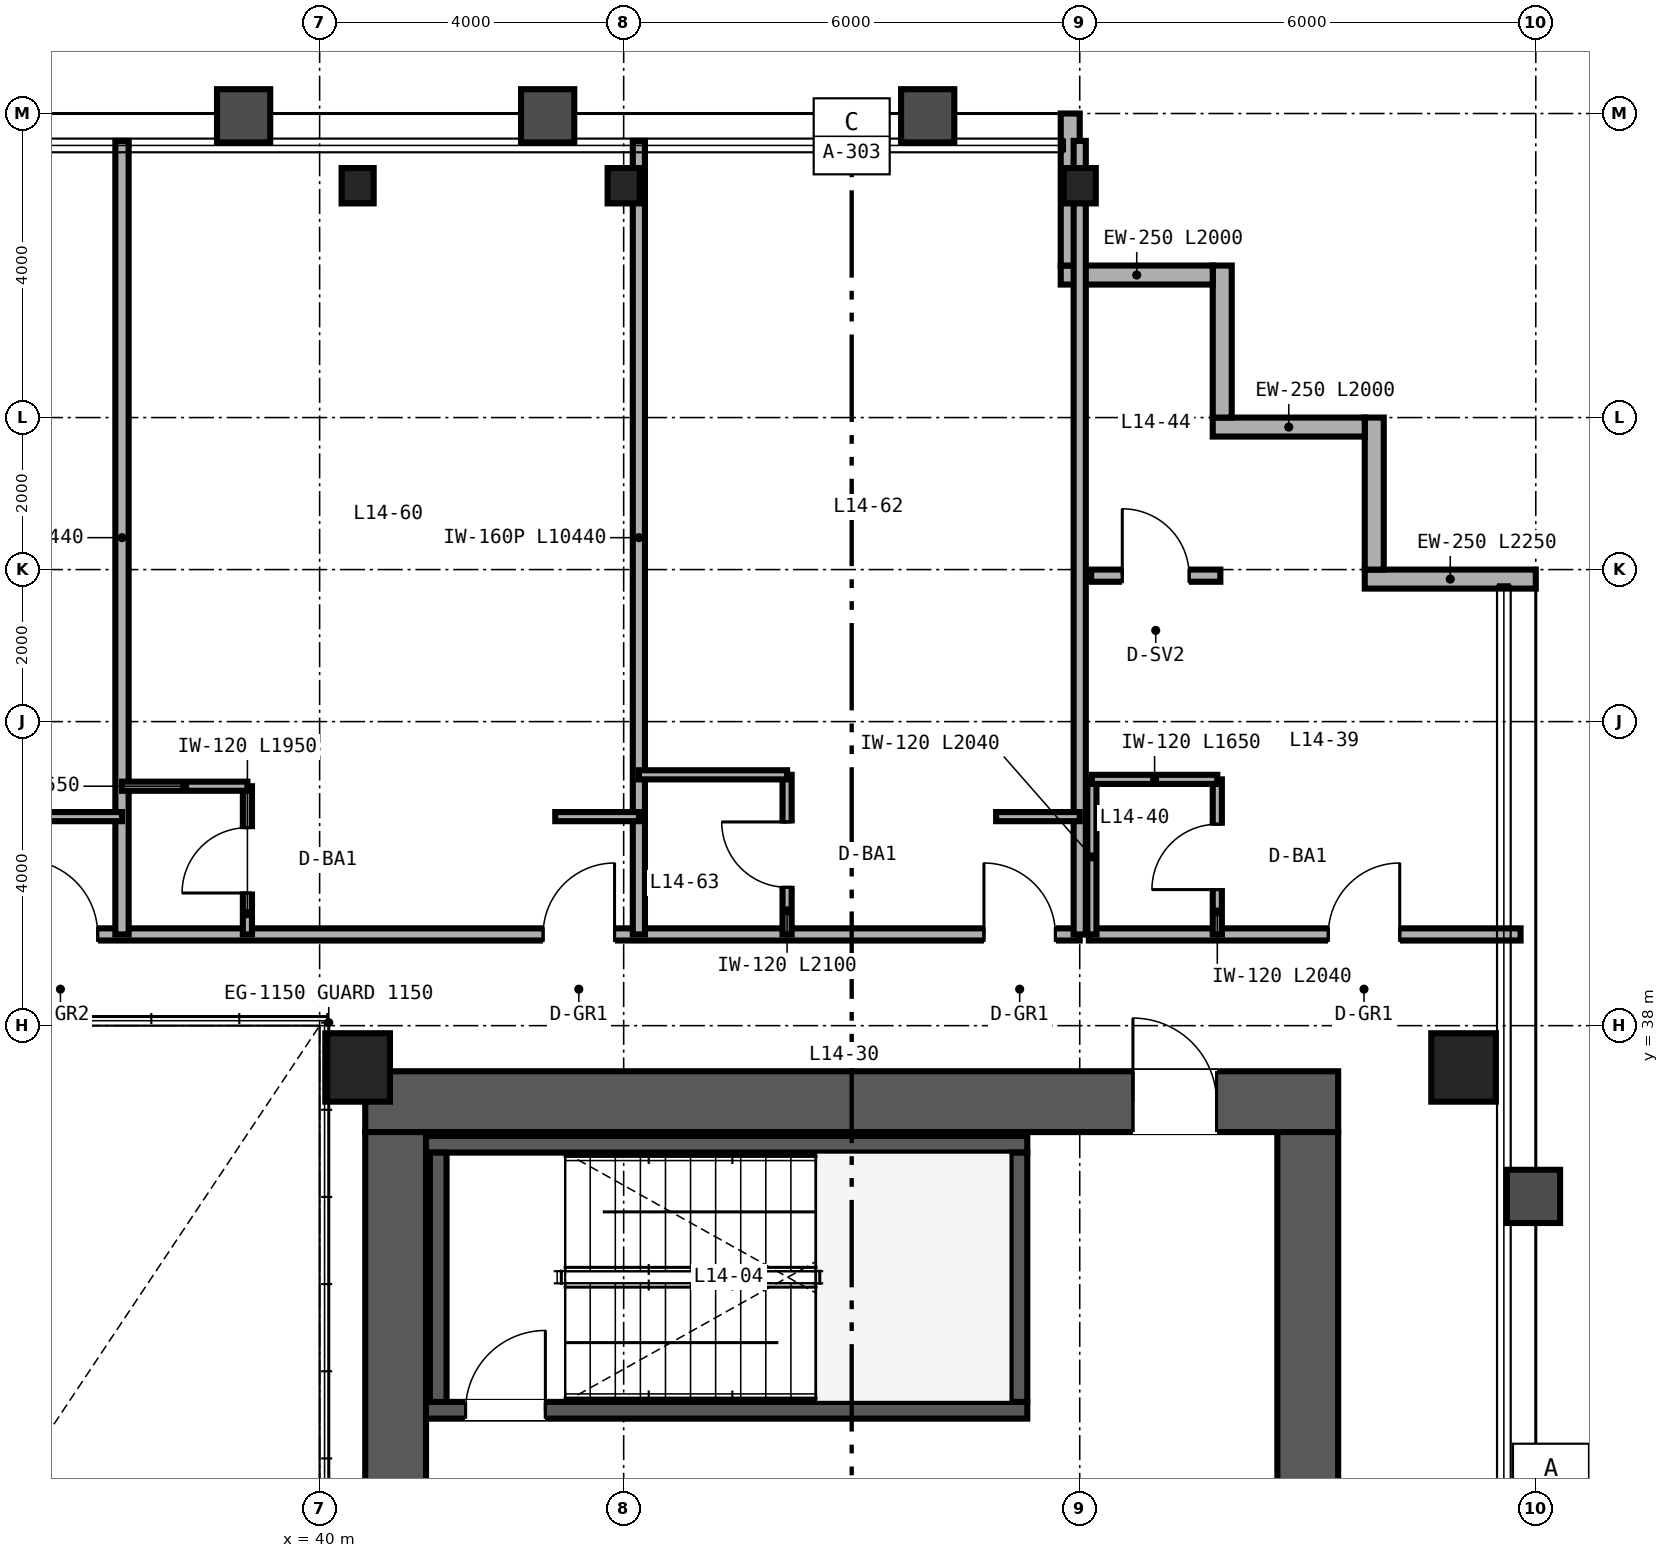
"""IFC4 building model, lengths in metres.
Left out: names, types, materials, properties, quantities, classifications, styles, units other than length and angle.
Written with IfcOpenShell. Run it as: python <this file> out.ifc"""

import sys

from ifc_helpers import new_model, si_unit, direction, frame, frame_2d, origin, origin_2d, place, context, subcontext, project, spatial, rectangle, hollow_rectangle, i_section, extrude, source, transform, mapped, element, fill, save


model = new_model("IFC4")
c1 = context("Model", 3, precision=1e-05, world=origin(), true_north=direction((0.0, 1.0)))
c2 = subcontext(c1, "Body", "Model", "MODEL_VIEW")
j1 = project(units=[si_unit("LENGTHUNIT", "METRE"), si_unit("PLANEANGLEUNIT", "RADIAN")], contexts=[c1])
p1 = place(None, origin())
s1 = spatial("IfcSite", under=j1, at=p1, CompositionType="ELEMENT")
p2 = place(p1, origin())
s2 = spatial("IfcBuilding", under=s1, at=p2, CompositionType="ELEMENT")
p3 = place(p2, frame((0.0, 0.0, 60.0)))
s3 = spatial("IfcBuildingStorey", under=s2, at=p3, CompositionType="ELEMENT", Elevation=60.0)
p4 = place(p3, frame((40.6, 37.0, 0.0), z_axis=(0.0, 0.0, 1.0), x_axis=(1.0, 0.0, 0.0)))
e1 = element("IfcWall", 1, at=p4, inside=s3, PredefinedType="SHEAR", context=c2, shape_type="SweptSolid", body=[
    extrude(rectangle(XDim=12.8, YDim=0.8, at=frame_2d((6.4, 0.0))), origin(), (0.0, 0.0, 1.0), 3.35),
])
p5 = place(p4, frame((10.1, 0.0, 0.0)))
e2 = element("IfcOpeningElement", 2, at=p5, cuts=e1, PredefinedType="OPENING", context=c2, shape_type="SweptSolid", body=[
    extrude(rectangle(XDim=1.1, YDim=2.15, at=frame_2d((0.55, 1.075))), frame((0.0, 0.41, 0.0), z_axis=(0.0, -1.0, 0.0), x_axis=(1.0, 0.0, 0.0)), (0.0, 0.0, 1.0), 0.82),
])
for number, where, z_axis, x_axis in (
    (3, (41.0, 15.4, 0.0), (0.0, 0.0, 1.0), (0.0, 1.0, 0.0)),
    (4, (53.0, 15.4, 0.0), (0.0, 0.0, 1.0), (0.0, 1.0, 0.0)),
):
    element("IfcWall", number, at=place(p3, frame(where, z_axis=z_axis, x_axis=x_axis)), inside=s3, PredefinedType="SHEAR", context=c2, shape_type="SweptSolid", body=[
        extrude(rectangle(XDim=21.2, YDim=0.8, at=frame_2d((10.6, 0.0))), origin(), (0.0, 0.0, 1.0), 3.35),
    ])
p6 = place(p3, frame((41.4, 32.94, 0.0), z_axis=(0.0, 0.0, 1.0), x_axis=(1.0, 0.0, 0.0)))
e5 = element("IfcWall", 5, at=p6, inside=s3, PredefinedType="SHEAR", context=c2, shape_type="SweptSolid", body=[
    extrude(rectangle(XDim=7.91, YDim=0.22, at=frame_2d((3.955, 0.0))), origin(), (0.0, 0.0, 1.0), 3.4),
])
p7 = place(p6, frame((0.52, 0.0, 0.0)))
e6 = element("IfcOpeningElement", 6, at=p7, cuts=e5, PredefinedType="OPENING", context=c2, shape_type="SweptSolid", body=[
    extrude(rectangle(XDim=1.05, YDim=2.15, at=frame_2d((0.525, 1.075))), frame((0.0, 0.12, 0.0), z_axis=(0.0, -1.0, 0.0), x_axis=(1.0, 0.0, 0.0)), (0.0, 0.0, 1.0), 0.24),
])
p8 = place(p3, frame((41.4, 36.44, 0.0), z_axis=(0.0, 0.0, 1.0), x_axis=(1.0, 0.0, 0.0)))
e7 = element("IfcWall", 7, at=p8, inside=s3, PredefinedType="SHEAR", context=c2, shape_type="SweptSolid", body=[
    extrude(rectangle(XDim=7.91, YDim=0.22, at=frame_2d((3.955, 0.0))), origin(), (0.0, 0.0, 1.0), 3.4),
])
for number, where, z_axis, x_axis in (
    (8, (41.56, 33.05, 0.0), (0.0, 0.0, 1.0), (0.0, 1.0, 0.0)),
    (9, (49.2, 33.05, 0.0), (0.0, 0.0, 1.0), (0.0, 1.0, 0.0)),
):
    element("IfcWall", number, at=place(p3, frame(where, z_axis=z_axis, x_axis=x_axis)), inside=s3, PredefinedType="SHEAR", context=c2, shape_type="SweptSolid", body=[
        extrude(rectangle(XDim=3.28, YDim=0.22, at=frame_2d((1.64, 0.0))), origin(), (0.0, 0.0, 1.0), 3.4),
    ])
m1 = source(origin(), c2, "Body", "SweptSolid", [
    extrude(hollow_rectangle(XDim=0.85, YDim=0.9, WallThickness=0.04, at=origin_2d()), origin(), (0.0, 0.0, 1.0), 3.35),
])
for number, where, z_axis, x_axis in (
    (10, (40.5, 37.45, 0.0), (0.0, 0.0, 1.0), (1.0, 0.0, 0.0)),
    (11, (55.05, 37.45, 0.0), (0.0, 0.0, 1.0), (1.0, 0.0, 0.0)),
):
    element("IfcColumn", number, at=place(p3, frame(where, z_axis=z_axis, x_axis=x_axis)), inside=s3, PredefinedType="COLUMN", context=c2, shape_type="MappedRepresentation", body=[
        mapped(m1, transform((0.0, 0.0, 0.0), scale=1.0)),
    ])
m2 = source(origin(), c2, "Body", "SweptSolid", [
    extrude(i_section(OverallWidth=0.422, OverallDepth=0.465, WebThickness=0.045, FlangeThickness=0.073, FilletRadius=0.025, at=origin_2d()), origin(), (0.0, 0.0, 1.0), 3.35),
])
for number, where, z_axis, x_axis in (
    (12, (40.5, 49.05, 0.0), (0.0, 0.0, 1.0), (1.0, 0.0, 0.0)),
    (13, (44.0, 49.05, 0.0), (0.0, 0.0, 1.0), (1.0, 0.0, 0.0)),
    (14, (50.0, 49.05, 0.0), (0.0, 0.0, 1.0), (1.0, 0.0, 0.0)),
):
    element("IfcColumn", number, at=place(p3, frame(where, z_axis=z_axis, x_axis=x_axis)), inside=s3, PredefinedType="COLUMN", context=c2, shape_type="MappedRepresentation", body=[
        mapped(m2, transform((0.0, 0.0, 0.0), scale=1.0)),
    ])
p9 = place(p3, frame((56.0, 43.875, 0.0), z_axis=(0.0, 0.0, 1.0), x_axis=(-1.0, 0.0, 0.0)))
e15 = element("IfcWall", 15, at=p9, inside=s3, PredefinedType="SOLIDWALL", context=c2, shape_type="SweptSolid", body=[
    extrude(rectangle(XDim=2.25, YDim=0.25, at=frame_2d((1.125, 0.0))), origin(), (0.0, 0.0, 1.0), 3.35),
])
for number, where, z_axis, x_axis in (
    (16, (53.875, 44.0, 0.0), (0.0, 0.0, 1.0), (0.0, 1.0, 0.0)),
    (17, (53.75, 45.875, 0.0), (0.0, 0.0, 1.0), (-1.0, 0.0, 0.0)),
    (18, (51.875, 46.0, 0.0), (0.0, 0.0, 1.0), (0.0, 1.0, 0.0)),
    (19, (51.75, 47.875, 0.0), (0.0, 0.0, 1.0), (-1.0, 0.0, 0.0)),
):
    element("IfcWall", number, at=place(p3, frame(where, z_axis=z_axis, x_axis=x_axis)), inside=s3, PredefinedType="SOLIDWALL", context=c2, shape_type="SweptSolid", body=[
        extrude(rectangle(XDim=2.0, YDim=0.25, at=frame_2d((1.0, 0.0))), origin(), (0.0, 0.0, 1.0), 3.35),
    ])
p10 = place(p3, frame((49.875, 48.0, 0.0), z_axis=(0.0, 0.0, 1.0), x_axis=(0.0, 1.0, 0.0)))
e20 = element("IfcWall", 20, at=p10, inside=s3, PredefinedType="SOLIDWALL", context=c2, shape_type="SweptSolid", body=[
    extrude(rectangle(XDim=2.0, YDim=0.25, at=frame_2d((1.0, 0.0))), origin(), (0.0, 0.0, 1.0), 2.657),
])
p11 = place(p3, frame((50.12, 39.2, 0.0), z_axis=(0.0, 0.0, 1.0), x_axis=(1.0, 0.0, 0.0)))
e21 = element("IfcWall", 21, at=p11, inside=s3, PredefinedType="PARTITIONING", context=c2, shape_type="SweptSolid", body=[
    extrude(rectangle(XDim=5.68, YDim=0.16, at=frame_2d((2.84, 0.0))), origin(), (0.0, 0.0, 1.0), 3.35),
])
p12 = place(p11, frame((3.15, 0.0, 0.0)))
e22 = element("IfcOpeningElement", 22, at=p12, cuts=e21, PredefinedType="OPENING", context=c2, shape_type="SweptSolid", body=[
    extrude(rectangle(XDim=0.94, YDim=2.15, at=frame_2d((0.47, 1.075))), frame((0.0, 0.09, 0.0), z_axis=(0.0, -1.0, 0.0), x_axis=(1.0, 0.0, 0.0)), (0.0, 0.0, 1.0), 0.18),
])
p13 = place(p3, frame((51.81, 39.2, 0.0), z_axis=(0.0, 0.0, 1.0), x_axis=(0.0, 1.0, 0.0)))
e23 = element("IfcWall", 23, at=p13, inside=s3, PredefinedType="PARTITIONING", context=c2, shape_type="SweptSolid", body=[
    extrude(rectangle(XDim=2.04, YDim=0.12, at=frame_2d((1.02, 0.0))), origin(), (0.0, 0.0, 1.0), 3.35),
])
p14 = place(p13, frame((0.59, 0.0, 0.0)))
e24 = element("IfcOpeningElement", 24, at=p14, cuts=e23, PredefinedType="OPENING", context=c2, shape_type="SweptSolid", body=[
    extrude(rectangle(XDim=0.86, YDim=2.1, at=frame_2d((0.43, 1.05))), frame((0.0, 0.07, 0.0), z_axis=(0.0, -1.0, 0.0), x_axis=(1.0, 0.0, 0.0)), (0.0, 0.0, 1.0), 0.14),
])
p15 = place(p3, frame((50.16, 39.2, 0.0), z_axis=(0.0, 0.0, 1.0), x_axis=(0.0, 1.0, 0.0)))
e25 = element("IfcWall", 25, at=p15, inside=s3, PredefinedType="PARTITIONING", context=c2, shape_type="SweptSolid", body=[
    extrude(rectangle(XDim=2.04, YDim=0.12, at=frame_2d((1.02, 0.0))), origin(), (0.0, 0.0, 1.0), 3.35),
])
p16 = place(p3, frame((50.16, 41.24, 0.0), z_axis=(0.0, 0.0, 1.0), x_axis=(1.0, 0.0, 0.0)))
e26 = element("IfcWall", 26, at=p16, inside=s3, PredefinedType="PARTITIONING", context=c2, shape_type="SweptSolid", body=[
    extrude(rectangle(XDim=1.65, YDim=0.12, at=frame_2d((0.825, 0.0))), origin(), (0.0, 0.0, 1.0), 3.35),
])
p17 = place(p3, frame((50.15, 43.92, 0.0), z_axis=(0.0, 0.0, 1.0), x_axis=(1.0, 0.0, 0.0)))
e27 = element("IfcWall", 27, at=p17, inside=s3, PredefinedType="PARTITIONING", context=c2, shape_type="SweptSolid", body=[
    extrude(rectangle(XDim=1.7, YDim=0.16, at=frame_2d((0.85, 0.0))), origin(), (0.0, 0.0, 1.0), 3.35),
])
p18 = place(p17, frame((0.41, 0.0, 0.0)))
e28 = element("IfcOpeningElement", 28, at=p18, cuts=e27, PredefinedType="OPENING", context=c2, shape_type="SweptSolid", body=[
    extrude(rectangle(XDim=0.88, YDim=2.15, at=frame_2d((0.44, 1.075))), frame((0.0, 0.09, 0.0), z_axis=(0.0, -1.0, 0.0), x_axis=(1.0, 0.0, 0.0)), (0.0, 0.0, 1.0), 0.18),
])
p19 = place(p3, frame((14.0, 39.2, 0.0), z_axis=(0.0, 0.0, 1.0), x_axis=(1.0, 0.0, 0.0)))
e29 = element("IfcWall", 29, at=p19, inside=s3, PredefinedType="PARTITIONING", context=c2, shape_type="SweptSolid", body=[
    extrude(rectangle(XDim=36.0, YDim=0.16, at=frame_2d((18.0, 0.0))), origin(), (0.0, 0.0, 1.0), 2.571),
])
p20 = place(p19, frame((6.5, 0.0, 0.0)))
e30 = element("IfcOpeningElement", 30, at=p20, cuts=e29, PredefinedType="OPENING", context=c2, shape_type="SweptSolid", body=[
    extrude(rectangle(XDim=0.98, YDim=2.2, at=frame_2d((0.49, 1.1))), frame((0.0, 0.09, 0.0), z_axis=(0.0, -1.0, 0.0), x_axis=(1.0, 0.0, 0.0)), (0.0, 0.0, 1.0), 0.18),
])
p21 = place(p19, frame((11.22, 0.0, 0.0)))
e31 = element("IfcOpeningElement", 31, at=p21, cuts=e29, PredefinedType="OPENING", context=c2, shape_type="SweptSolid", body=[
    extrude(rectangle(XDim=0.96, YDim=2.15, at=frame_2d((0.48, 1.075))), frame((0.0, 0.09, 0.0), z_axis=(0.0, -1.0, 0.0), x_axis=(1.0, 0.0, 0.0)), (0.0, 0.0, 1.0), 0.18),
])
p22 = place(p19, frame((22.1, 0.0, 0.0)))
e32 = element("IfcOpeningElement", 32, at=p22, cuts=e29, PredefinedType="OPENING", context=c2, shape_type="SweptSolid", body=[
    extrude(rectangle(XDim=0.98, YDim=2.2, at=frame_2d((0.49, 1.1))), frame((0.0, 0.09, 0.0), z_axis=(0.0, -1.0, 0.0), x_axis=(1.0, 0.0, 0.0)), (0.0, 0.0, 1.0), 0.18),
])
p23 = place(p19, frame((28.94, 0.0, 0.0)))
e33 = element("IfcOpeningElement", 33, at=p23, cuts=e29, PredefinedType="OPENING", context=c2, shape_type="SweptSolid", body=[
    extrude(rectangle(XDim=0.94, YDim=2.15, at=frame_2d((0.47, 1.075))), frame((0.0, 0.09, 0.0), z_axis=(0.0, -1.0, 0.0), x_axis=(1.0, 0.0, 0.0)), (0.0, 0.0, 1.0), 0.18),
])
p24 = place(p19, frame((34.74, 0.0, 0.0)))
e34 = element("IfcOpeningElement", 34, at=p24, cuts=e29, PredefinedType="OPENING", context=c2, shape_type="SweptSolid", body=[
    extrude(rectangle(XDim=0.94, YDim=2.15, at=frame_2d((0.47, 1.075))), frame((0.0, 0.09, 0.0), z_axis=(0.0, -1.0, 0.0), x_axis=(1.0, 0.0, 0.0)), (0.0, 0.0, 1.0), 0.18),
])
p25 = place(p3, frame((50.0, 39.2, 0.0), z_axis=(0.0, 0.0, 1.0), x_axis=(0.0, 1.0, 0.0)))
e35 = element("IfcWall", 35, at=p25, inside=s3, PredefinedType="PARTITIONING", context=c2, shape_type="SweptSolid", body=[
    extrude(rectangle(XDim=10.44, YDim=0.16, at=frame_2d((5.22, 0.0))), origin(), (0.0, 0.0, 1.0), 2.657),
])
p26 = place(p3, frame((37.4, 39.2, 0.0), z_axis=(0.0, 0.0, 1.0), x_axis=(0.0, 1.0, 0.0)))
e36 = element("IfcWall", 36, at=p26, inside=s3, PredefinedType="PARTITIONING", context=c2, shape_type="SweptSolid", body=[
    extrude(rectangle(XDim=10.44, YDim=0.175, at=frame_2d((5.22, 0.0))), origin(), (0.0, 0.0, 1.0), 2.423),
])
p27 = place(p3, frame((36.3, 40.75, 0.0), z_axis=(0.0, 0.0, 1.0), x_axis=(1.0, 0.0, 0.0)))
e37 = element("IfcWall", 37, at=p27, inside=s3, PredefinedType="PARTITIONING", context=c2, shape_type="SweptSolid", body=[
    extrude(rectangle(XDim=1.1, YDim=0.12, at=frame_2d((0.55, 0.0))), origin(), (0.0, 0.0, 1.0), 3.35),
])
p28 = place(p3, frame((44.2, 39.2, 0.0), z_axis=(0.0, 0.0, 1.0), x_axis=(0.0, 1.0, 0.0)))
e38 = element("IfcWall", 38, at=p28, inside=s3, PredefinedType="PARTITIONING", context=c2, shape_type="SweptSolid", body=[
    extrude(rectangle(XDim=10.44, YDim=0.16, at=frame_2d((5.22, 0.0))), origin(), (0.0, 0.0, 1.0), 2.657),
])
p29 = place(p3, frame((39.05, 39.2, 0.0), z_axis=(0.0, 0.0, 1.0), x_axis=(0.0, 1.0, 0.0)))
e39 = element("IfcWall", 39, at=p29, inside=s3, PredefinedType="PARTITIONING", context=c2, shape_type="SweptSolid", body=[
    extrude(rectangle(XDim=1.95, YDim=0.12, at=frame_2d((0.975, 0.0))), origin(), (0.0, 0.0, 1.0), 3.35),
])
p30 = place(p29, frame((0.545, 0.0, 0.0)))
e40 = element("IfcOpeningElement", 40, at=p30, cuts=e39, PredefinedType="OPENING", context=c2, shape_type="SweptSolid", body=[
    extrude(rectangle(XDim=0.86, YDim=2.1, at=frame_2d((0.43, 1.05))), frame((0.0, 0.07, 0.0), z_axis=(0.0, -1.0, 0.0), x_axis=(1.0, 0.0, 0.0)), (0.0, 0.0, 1.0), 0.14),
])
p31 = place(p3, frame((37.4, 41.15, 0.0), z_axis=(0.0, 0.0, 1.0), x_axis=(1.0, 0.0, 0.0)))
e41 = element("IfcWall", 41, at=p31, inside=s3, PredefinedType="PARTITIONING", context=c2, shape_type="SweptSolid", body=[
    extrude(rectangle(XDim=1.65, YDim=0.12, at=frame_2d((0.825, 0.0))), origin(), (0.0, 0.0, 1.0), 3.35),
])
p32 = place(p3, frame((43.1, 40.75, 0.0), z_axis=(0.0, 0.0, 1.0), x_axis=(1.0, 0.0, 0.0)))
e42 = element("IfcWall", 42, at=p32, inside=s3, PredefinedType="PARTITIONING", context=c2, shape_type="SweptSolid", body=[
    extrude(rectangle(XDim=1.1, YDim=0.12, at=frame_2d((0.55, 0.0))), origin(), (0.0, 0.0, 1.0), 3.35),
])
p33 = place(p3, frame((46.15, 39.2, 0.0), z_axis=(0.0, 0.0, 1.0), x_axis=(0.0, 1.0, 0.0)))
e43 = element("IfcWall", 43, at=p33, inside=s3, PredefinedType="PARTITIONING", context=c2, shape_type="SweptSolid", body=[
    extrude(rectangle(XDim=2.1, YDim=0.12, at=frame_2d((1.05, 0.0))), origin(), (0.0, 0.0, 1.0), 3.35),
])
p34 = place(p33, frame((0.62, 0.0, 0.0)))
e44 = element("IfcOpeningElement", 44, at=p34, cuts=e43, PredefinedType="OPENING", context=c2, shape_type="SweptSolid", body=[
    extrude(rectangle(XDim=0.86, YDim=2.1, at=frame_2d((0.43, 1.05))), frame((0.0, 0.07, 0.0), z_axis=(0.0, -1.0, 0.0), x_axis=(1.0, 0.0, 0.0)), (0.0, 0.0, 1.0), 0.14),
])
p35 = place(p3, frame((44.2, 41.3, 0.0), z_axis=(0.0, 0.0, 1.0), x_axis=(1.0, 0.0, 0.0)))
e45 = element("IfcWall", 45, at=p35, inside=s3, PredefinedType="PARTITIONING", context=c2, shape_type="SweptSolid", body=[
    extrude(rectangle(XDim=1.95, YDim=0.12, at=frame_2d((0.975, 0.0))), origin(), (0.0, 0.0, 1.0), 3.35),
])
p36 = place(p3, frame((48.9, 40.75, 0.0), z_axis=(0.0, 0.0, 1.0), x_axis=(1.0, 0.0, 0.0)))
e46 = element("IfcWall", 46, at=p36, inside=s3, PredefinedType="PARTITIONING", context=c2, shape_type="SweptSolid", body=[
    extrude(rectangle(XDim=1.1, YDim=0.12, at=frame_2d((0.55, 0.0))), origin(), (0.0, 0.0, 1.0), 3.35),
])
m3 = source(origin(), c2, "Body", "SweptSolid", [
    extrude(rectangle(XDim=1.05, YDim=2.15, at=frame_2d((0.525, 1.075))), frame((0.0, 0.025, 0.0), z_axis=(0.0, -1.0, 0.0), x_axis=(1.0, 0.0, 0.0)), (0.0, 0.0, 1.0), 0.05),
])
p37 = place(p7, origin())
e47 = element("IfcDoor", 47, at=p37, inside=s3, OperationType="SINGLE_SWING_RIGHT", PredefinedType="DOOR", context=c2, shape_type="MappedRepresentation", body=[
    mapped(m3, transform((0.0, 0.0, 0.0), scale=1.0)),
])
fill(e6, e47)
m4 = source(origin(), c2, "Body", "SweptSolid", [
    extrude(rectangle(XDim=1.1, YDim=2.15, at=frame_2d((0.55, 1.075))), frame((0.0, 0.025, 0.0), z_axis=(0.0, -1.0, 0.0), x_axis=(1.0, 0.0, 0.0)), (0.0, 0.0, 1.0), 0.05),
])
p38 = place(p5, origin())
e48 = element("IfcDoor", 48, at=p38, inside=s3, OperationType="SINGLE_SWING_LEFT", PredefinedType="DOOR", context=c2, shape_type="MappedRepresentation", body=[
    mapped(m4, transform((0.0, 0.0, 0.0), scale=1.0)),
])
fill(e2, e48)
m5 = source(origin(), c2, "Body", "SweptSolid", [
    extrude(rectangle(XDim=0.86, YDim=2.1, at=frame_2d((0.43, 1.05))), frame((0.0, 0.025, 0.0), z_axis=(0.0, -1.0, 0.0), x_axis=(1.0, 0.0, 0.0)), (0.0, 0.0, 1.0), 0.05),
])
p39 = place(p14, origin())
e49 = element("IfcDoor", 49, at=p39, inside=s3, OperationType="SINGLE_SWING_LEFT", PredefinedType="DOOR", context=c2, shape_type="MappedRepresentation", body=[
    mapped(m5, transform((0.0, 0.0, 0.0), scale=1.0)),
])
fill(e24, e49)
m6 = source(origin(), c2, "Body", "SweptSolid", [
    extrude(rectangle(XDim=0.94, YDim=2.15, at=frame_2d((0.47, 1.075))), frame((0.0, 0.025, 0.0), z_axis=(0.0, -1.0, 0.0), x_axis=(1.0, 0.0, 0.0)), (0.0, 0.0, 1.0), 0.05),
])
p40 = place(p12, origin())
e50 = element("IfcDoor", 50, at=p40, inside=s3, OperationType="SINGLE_SWING_RIGHT", PredefinedType="DOOR", context=c2, shape_type="MappedRepresentation", body=[
    mapped(m6, transform((0.0, 0.0, 0.0), scale=1.0)),
])
fill(e22, e50)
m7 = source(origin(), c2, "Body", "SweptSolid", [
    extrude(rectangle(XDim=0.88, YDim=2.15, at=frame_2d((0.44, 1.075))), frame((0.0, 0.025, 0.0), z_axis=(0.0, -1.0, 0.0), x_axis=(1.0, 0.0, 0.0)), (0.0, 0.0, 1.0), 0.05),
])
p41 = place(p18, origin())
e51 = element("IfcDoor", 51, at=p41, inside=s3, OperationType="SINGLE_SWING_LEFT", PredefinedType="DOOR", context=c2, shape_type="MappedRepresentation", body=[
    mapped(m7, transform((0.0, 0.0, 0.0), scale=1.0)),
])
fill(e28, e51)
p42 = place(p30, origin())
e52 = element("IfcDoor", 52, at=p42, inside=s3, OperationType="SINGLE_SWING_LEFT", PredefinedType="DOOR", context=c2, shape_type="MappedRepresentation", body=[
    mapped(m5, transform((0.0, 0.0, 0.0), scale=1.0)),
])
fill(e40, e52)
p43 = place(p34, origin())
e53 = element("IfcDoor", 53, at=p43, inside=s3, OperationType="SINGLE_SWING_RIGHT", PredefinedType="DOOR", context=c2, shape_type="MappedRepresentation", body=[
    mapped(m5, transform((0.0, 0.0, 0.0), scale=1.0)),
])
fill(e44, e53)
m8 = source(origin(), c2, "Body", "SweptSolid", [
    extrude(rectangle(XDim=0.98, YDim=2.2, at=frame_2d((0.49, 1.1))), frame((0.0, 0.025, 0.0), z_axis=(0.0, -1.0, 0.0), x_axis=(1.0, 0.0, 0.0)), (0.0, 0.0, 1.0), 0.05),
])
p44 = place(p22, origin())
e54 = element("IfcDoor", 54, at=p44, inside=s3, OperationType="SINGLE_SWING_LEFT", PredefinedType="DOOR", context=c2, shape_type="MappedRepresentation", body=[
    mapped(m8, transform((0.0, 0.0, 0.0), scale=1.0)),
])
fill(e32, e54)
p45 = place(p23, origin())
e55 = element("IfcDoor", 55, at=p45, inside=s3, OperationType="SINGLE_SWING_RIGHT", PredefinedType="DOOR", context=c2, shape_type="MappedRepresentation", body=[
    mapped(m6, transform((0.0, 0.0, 0.0), scale=1.0)),
])
fill(e33, e55)
p46 = place(p24, origin())
e56 = element("IfcDoor", 56, at=p46, inside=s3, OperationType="SINGLE_SWING_LEFT", PredefinedType="DOOR", context=c2, shape_type="MappedRepresentation", body=[
    mapped(m6, transform((0.0, 0.0, 0.0), scale=1.0)),
])
fill(e34, e56)
save(model, sys.argv[1])
